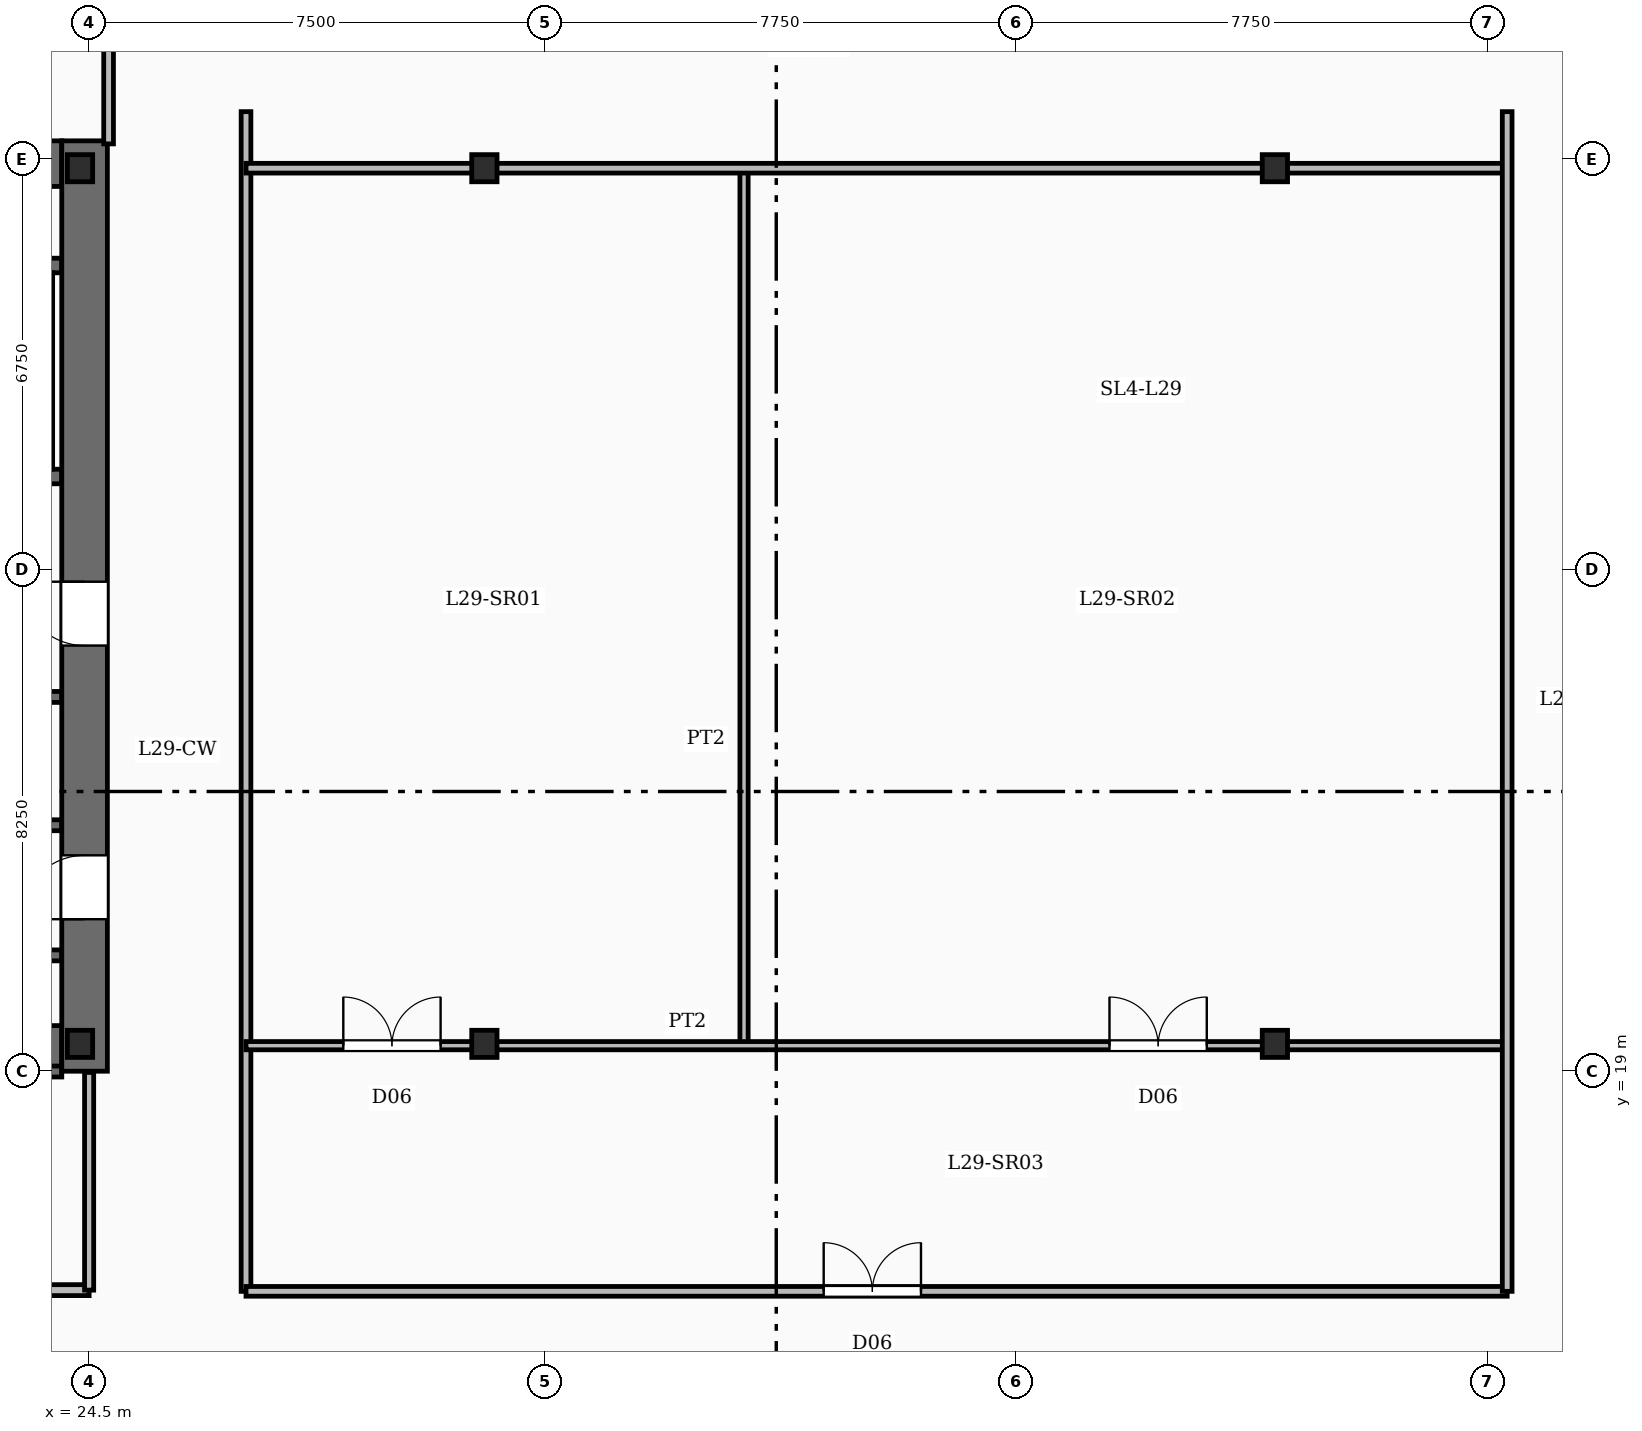
"""IFC4 building model, lengths in metres.
Left out: names, types, materials, properties, quantities, classifications, styles, units other than length and angle.
Written with IfcOpenShell. Run it as: python <this file> out.ifc"""

import sys

from ifc_helpers import new_model, si_unit, direction, frame, frame_2d, origin, origin_2d, place, context, subcontext, project, spatial, rectangle, i_section, extrude, element, fill, save


model = new_model("IFC4")
c1 = context("Model", 3, precision=1e-05, world=origin(), true_north=direction((0.0, 1.0)))
c2 = subcontext(c1, "Body", "Model", "MODEL_VIEW")
j1 = project(units=[si_unit("LENGTHUNIT", "METRE"), si_unit("PLANEANGLEUNIT", "RADIAN")], contexts=[c1])
p1 = place(None, origin())
s1 = spatial("IfcSite", under=j1, at=p1, CompositionType="ELEMENT")
p2 = place(p1, origin())
s2 = spatial("IfcBuilding", under=s1, at=p2, CompositionType="ELEMENT")
p3 = place(p2, frame((0.0, 0.0, 125.95)))
s3 = spatial("IfcBuildingStorey", under=s2, at=p3, CompositionType="ELEMENT", Elevation=125.95)
p4 = place(p3, frame((24.425, 19.0, -0.31), z_axis=(0.0, 0.0, 1.0), x_axis=(0.0, 1.0, 0.0)))
e1 = element("IfcWall", 1, at=p4, inside=s3, PredefinedType="SHEAR", context=c2, shape_type="SweptSolid", body=[
    extrude(rectangle(XDim=15.3, YDim=0.75, at=frame_2d((7.65, 0.0))), origin(), (0.0, 0.0, 1.0), 4.84),
])
p5 = place(p4, frame((2.5, 0.0, 0.31)))
e2 = element("IfcOpeningElement", 2, at=p5, cuts=e1, PredefinedType="OPENING", context=c2, shape_type="SweptSolid", body=[
    extrude(rectangle(XDim=1.05, YDim=2.15, at=frame_2d((0.525, 1.075))), frame((0.0, 0.385, 0.0), z_axis=(0.0, -1.0, 0.0), x_axis=(1.0, 0.0, 0.0)), (0.0, 0.0, 1.0), 0.77),
])
p6 = place(p4, frame((7.0, 0.0, 0.31)))
e3 = element("IfcOpeningElement", 3, at=p6, cuts=e1, PredefinedType="OPENING", context=c2, shape_type="SweptSolid", body=[
    extrude(rectangle(XDim=1.05, YDim=2.15, at=frame_2d((0.525, 1.075))), frame((0.0, 0.385, 0.0), z_axis=(0.0, -1.0, 0.0), x_axis=(1.0, 0.0, 0.0)), (0.0, 0.0, 1.0), 0.77),
])
for number, where, z_axis, x_axis in (
    (4, (14.85, 19.375, -0.31), (0.0, 0.0, 1.0), (1.0, 0.0, 0.0)),
    (5, (14.85, 33.925, -0.31), (0.0, 0.0, 1.0), (1.0, 0.0, 0.0)),
):
    element("IfcWall", number, at=place(p3, frame(where, z_axis=z_axis, x_axis=x_axis)), inside=s3, PredefinedType="SHEAR", context=c2, shape_type="SweptSolid", body=[
        extrude(rectangle(XDim=9.2, YDim=0.75, at=frame_2d((4.6, 0.0))), origin(), (0.0, 0.0, 1.0), 4.84),
    ])
for number, where, z_axis, x_axis in (
    (6, (24.35, 19.45, -0.31), (0.0, 0.0, 1.0), (1.0, 0.0, 0.0)),
    (7, (24.35, 33.85, -0.31), (0.0, 0.0, 1.0), (1.0, 0.0, 0.0)),
    (8, (31.0, 19.45, -0.31), (0.0, 0.0, 1.0), (1.0, 0.0, 0.0)),
    (9, (44.0, 19.45, -0.31), (0.0, 0.0, 1.0), (1.0, 0.0, 0.0)),
    (10, (31.0, 33.85, -0.31), (0.0, 0.0, 1.0), (1.0, 0.0, 0.0)),
    (11, (44.0, 33.85, -0.31), (0.0, 0.0, 1.0), (1.0, 0.0, 0.0)),
):
    element("IfcColumn", number, at=place(p3, frame(where, z_axis=z_axis, x_axis=x_axis)), inside=s3, PredefinedType="COLUMN", context=c2, shape_type="SweptSolid", body=[
        extrude(i_section(OverallWidth=0.416, OverallDepth=0.446, WebThickness=0.039, FlangeThickness=0.063, FilletRadius=0.02, at=origin_2d()), origin(), (0.0, 0.0, 1.0), 4.84),
    ])
p7 = place(p3, frame((24.05, 28.78, 0.0), z_axis=(0.0, 0.0, 1.0), x_axis=(-1.0, 0.0, 0.0)))
e12 = element("IfcWall", 12, at=p7, inside=s3, PredefinedType="SOLIDWALL", context=c2, shape_type="SweptSolid", body=[
    extrude(rectangle(XDim=9.2, YDim=0.24, at=frame_2d((4.6, 0.0))), origin(), (0.0, 0.0, 1.0), 4.53),
])
p8 = place(p7, frame((7.53, 0.0, 0.0)))
e13 = element("IfcOpeningElement", 13, at=p8, cuts=e12, PredefinedType="OPENING", context=c2, shape_type="SweptSolid", body=[
    extrude(rectangle(XDim=1.1, YDim=2.15, at=frame_2d((0.55, 1.075))), frame((0.0, 0.13, 0.0), z_axis=(0.0, -1.0, 0.0), x_axis=(1.0, 0.0, 0.0)), (0.0, 0.0, 1.0), 0.26),
])
p9 = place(p3, frame((14.85, 32.25, 0.0), z_axis=(0.0, 0.0, 1.0), x_axis=(1.0, 0.0, 0.0)))
e14 = element("IfcWall", 14, at=p9, inside=s3, PredefinedType="SOLIDWALL", context=c2, shape_type="SweptSolid", body=[
    extrude(rectangle(XDim=9.2, YDim=0.24, at=frame_2d((4.6, 0.0))), origin(), (0.0, 0.0, 1.0), 4.53),
])
p10 = place(p3, frame((23.78, 28.9, 0.0), z_axis=(0.0, 0.0, 1.0), x_axis=(0.0, 1.0, 0.0)))
e15 = element("IfcWall", 15, at=p10, inside=s3, PredefinedType="SOLIDWALL", context=c2, shape_type="SweptSolid", body=[
    extrude(rectangle(XDim=3.23, YDim=0.24, at=frame_2d((1.615, 0.0))), origin(), (0.0, 0.0, 1.0), 4.53),
])
p11 = place(p3, frame((20.9, 20.905, 0.0), z_axis=(0.0, 0.0, 1.0), x_axis=(1.0, 0.0, 0.0)))
e16 = element("IfcWall", 16, at=p11, inside=s3, PredefinedType="SOLIDWALL", context=c2, shape_type="SweptSolid", body=[
    extrude(rectangle(XDim=3.15, YDim=0.18, at=frame_2d((1.575, 0.0))), origin(), (0.0, 0.0, 1.0), 4.53),
])
p12 = place(p11, frame((0.7, 0.0, 0.0)))
e17 = element("IfcOpeningElement", 17, at=p12, cuts=e16, PredefinedType="OPENING", context=c2, shape_type="SweptSolid", body=[
    extrude(rectangle(XDim=1.2, YDim=2.2, at=frame_2d((0.6, 1.1))), frame((0.0, 0.1, 0.0), z_axis=(0.0, -1.0, 0.0), x_axis=(1.0, 0.0, 0.0)), (0.0, 0.0, 1.0), 0.2),
])
p13 = place(p3, frame((20.9, 18.995, 0.0), z_axis=(0.0, 0.0, 1.0), x_axis=(1.0, 0.0, 0.0)))
e18 = element("IfcWall", 18, at=p13, inside=s3, PredefinedType="SOLIDWALL", context=c2, shape_type="SweptSolid", body=[
    extrude(rectangle(XDim=3.15, YDim=0.18, at=frame_2d((1.575, 0.0))), origin(), (0.0, 0.0, 1.0), 4.53),
])
for number, where, z_axis, x_axis in (
    (19, (20.95, 25.155, 0.0), (0.0, 0.0, 1.0), (1.0, 0.0, 0.0)),
    (20, (20.95, 23.045, 0.0), (0.0, 0.0, 1.0), (1.0, 0.0, 0.0)),
):
    element("IfcWall", number, at=place(p3, frame(where, z_axis=z_axis, x_axis=x_axis)), inside=s3, PredefinedType="SOLIDWALL", context=c2, shape_type="SweptSolid", body=[
        extrude(rectangle(XDim=3.1, YDim=0.18, at=frame_2d((1.55, 0.0))), origin(), (0.0, 0.0, 1.0), 4.53),
    ])
p14 = place(p3, frame((14.6, 15.4, 0.0), z_axis=(0.0, 0.0, 1.0), x_axis=(1.0, 0.0, 0.0)))
e21 = element("IfcWall", 21, at=p14, inside=s3, PredefinedType="PARTITIONING", context=c2, shape_type="SweptSolid", body=[
    extrude(rectangle(XDim=9.9, YDim=0.18, at=frame_2d((4.95, 0.0))), origin(), (0.0, 0.0, 1.0), 3.59),
])
p15 = place(p14, frame((1.99, 0.0, 0.0)))
e22 = element("IfcOpeningElement", 22, at=p15, cuts=e21, PredefinedType="OPENING", context=c2, shape_type="SweptSolid", body=[
    extrude(rectangle(XDim=0.92, YDim=2.1, at=frame_2d((0.46, 1.05))), frame((0.0, 0.1, 0.0), z_axis=(0.0, -1.0, 0.0), x_axis=(1.0, 0.0, 0.0)), (0.0, 0.0, 1.0), 0.2),
])
p16 = place(p14, frame((6.94, 0.0, 0.0)))
e23 = element("IfcOpeningElement", 23, at=p16, cuts=e21, PredefinedType="OPENING", context=c2, shape_type="SweptSolid", body=[
    extrude(rectangle(XDim=0.92, YDim=2.1, at=frame_2d((0.46, 1.05))), frame((0.0, 0.1, 0.0), z_axis=(0.0, -1.0, 0.0), x_axis=(1.0, 0.0, 0.0)), (0.0, 0.0, 1.0), 0.2),
])
p17 = place(p3, frame((24.5, 15.4, 0.0), z_axis=(0.0, 0.0, 1.0), x_axis=(0.0, 1.0, 0.0)))
e24 = element("IfcWall", 24, at=p17, inside=s3, PredefinedType="PARTITIONING", context=c2, shape_type="SweptSolid", body=[
    extrude(rectangle(XDim=3.58, YDim=0.15, at=frame_2d((1.79, 0.0))), origin(), (0.0, 0.0, 1.0), 3.59),
])
p18 = place(p3, frame((27.08, 19.42, 0.0), z_axis=(0.0, 0.0, 1.0), x_axis=(1.0, 0.0, 0.0)))
e25 = element("IfcWall", 25, at=p18, inside=s3, PredefinedType="PARTITIONING", context=c2, shape_type="SweptSolid", body=[
    extrude(rectangle(XDim=20.74, YDim=0.135, at=frame_2d((10.37, 0.0))), origin(), (0.0, 0.0, 1.0), 3.59),
])
p19 = place(p18, frame((1.6, 0.0, 0.0)))
e26 = element("IfcOpeningElement", 26, at=p19, cuts=e25, PredefinedType="OPENING", context=c2, shape_type="SweptSolid", body=[
    extrude(rectangle(XDim=1.6, YDim=2.15, at=frame_2d((0.8, 1.075))), frame((0.0, 0.077, 0.0), z_axis=(0.0, -1.0, 0.0), x_axis=(1.0, 0.0, 0.0)), (0.0, 0.0, 1.0), 0.155),
])
p20 = place(p18, frame((14.2, 0.0, 0.0)))
e27 = element("IfcOpeningElement", 27, at=p20, cuts=e25, PredefinedType="OPENING", context=c2, shape_type="SweptSolid", body=[
    extrude(rectangle(XDim=1.6, YDim=2.15, at=frame_2d((0.8, 1.075))), frame((0.0, 0.077, 0.0), z_axis=(0.0, -1.0, 0.0), x_axis=(1.0, 0.0, 0.0)), (0.0, 0.0, 1.0), 0.155),
])
p21 = place(p3, frame((27.08, 33.85, 0.0), z_axis=(0.0, 0.0, 1.0), x_axis=(1.0, 0.0, 0.0)))
e28 = element("IfcWall", 28, at=p21, inside=s3, PredefinedType="PARTITIONING", context=c2, shape_type="SweptSolid", body=[
    extrude(rectangle(XDim=20.74, YDim=0.16, at=frame_2d((10.37, 0.0))), origin(), (0.0, 0.0, 1.0), 3.59),
])
p22 = place(p3, frame((35.27, 19.42, 0.0), z_axis=(0.0, 0.0, 1.0), x_axis=(0.0, 1.0, 0.0)))
e29 = element("IfcWall", 29, at=p22, inside=s3, PredefinedType="PARTITIONING", context=c2, shape_type="SweptSolid", body=[
    extrude(rectangle(XDim=14.43, YDim=0.135, at=frame_2d((7.215, 0.0))), origin(), (0.0, 0.0, 1.0), 3.59),
])
p23 = place(p3, frame((27.08, 15.38, 0.0), z_axis=(0.0, 0.0, 1.0), x_axis=(1.0, 0.0, 0.0)))
e30 = element("IfcWall", 30, at=p23, inside=s3, PredefinedType="PARTITIONING", context=c2, shape_type="SweptSolid", body=[
    extrude(rectangle(XDim=20.74, YDim=0.16, at=frame_2d((10.37, 0.0))), origin(), (0.0, 0.0, 1.0), 3.59),
])
p24 = place(p23, frame((9.5, 0.0, 0.0)))
e31 = element("IfcOpeningElement", 31, at=p24, cuts=e30, PredefinedType="OPENING", context=c2, shape_type="SweptSolid", body=[
    extrude(rectangle(XDim=1.6, YDim=2.15, at=frame_2d((0.8, 1.075))), frame((0.0, 0.09, 0.0), z_axis=(0.0, -1.0, 0.0), x_axis=(1.0, 0.0, 0.0)), (0.0, 0.0, 1.0), 0.18),
])
for number, where, z_axis, x_axis in (
    (32, (27.08, 15.38, 0.0), (0.0, 0.0, 1.0), (0.0, 1.0, 0.0)),
    (33, (47.82, 15.38, 0.0), (0.0, 0.0, 1.0), (0.0, 1.0, 0.0)),
):
    element("IfcWall", number, at=place(p3, frame(where, z_axis=z_axis, x_axis=x_axis)), inside=s3, PredefinedType="PARTITIONING", context=c2, shape_type="SweptSolid", body=[
        extrude(rectangle(XDim=19.4, YDim=0.16, at=frame_2d((9.7, 0.0))), origin(), (0.0, 0.0, 1.0), 3.59),
    ])
p25 = place(p3, frame((24.82, 34.25, 0.0), z_axis=(0.0, 0.0, 1.0), x_axis=(0.0, 1.0, 0.0)))
e34 = element("IfcWall", 34, at=p25, inside=s3, PredefinedType="PARTITIONING", context=c2, shape_type="SweptSolid", body=[
    extrude(rectangle(XDim=2.77, YDim=0.16, at=frame_2d((1.385, 0.0))), origin(), (0.0, 0.0, 1.0), 3.59),
])
p26 = place(p5, origin())
e35 = element("IfcDoor", 35, at=p26, inside=s3, OperationType="SINGLE_SWING_LEFT", PredefinedType="DOOR", context=c2, shape_type="SweptSolid", body=[
    extrude(rectangle(XDim=1.05, YDim=2.15, at=frame_2d((0.525, 1.075))), frame((0.0, 0.025, 0.0), z_axis=(0.0, -1.0, 0.0), x_axis=(1.0, 0.0, 0.0)), (0.0, 0.0, 1.0), 0.05),
])
fill(e2, e35)
p27 = place(p6, origin())
e36 = element("IfcDoor", 36, at=p27, inside=s3, OperationType="SINGLE_SWING_RIGHT", PredefinedType="DOOR", context=c2, shape_type="SweptSolid", body=[
    extrude(rectangle(XDim=1.05, YDim=2.15, at=frame_2d((0.525, 1.075))), frame((0.0, 0.025, 0.0), z_axis=(0.0, -1.0, 0.0), x_axis=(1.0, 0.0, 0.0)), (0.0, 0.0, 1.0), 0.05),
])
fill(e3, e36)
p28 = place(p19, origin())
e37 = element("IfcDoor", 37, at=p28, inside=s3, OperationType="DOUBLE_DOOR_SINGLE_SWING", PredefinedType="DOOR", context=c2, shape_type="SweptSolid", body=[
    extrude(rectangle(XDim=1.6, YDim=2.15, at=frame_2d((0.8, 1.075))), frame((0.0, 0.025, 0.0), z_axis=(0.0, -1.0, 0.0), x_axis=(1.0, 0.0, 0.0)), (0.0, 0.0, 1.0), 0.05),
])
fill(e26, e37)
p29 = place(p20, origin())
e38 = element("IfcDoor", 38, at=p29, inside=s3, OperationType="DOUBLE_DOOR_SINGLE_SWING", PredefinedType="DOOR", context=c2, shape_type="SweptSolid", body=[
    extrude(rectangle(XDim=1.6, YDim=2.15, at=frame_2d((0.8, 1.075))), frame((0.0, 0.025, 0.0), z_axis=(0.0, -1.0, 0.0), x_axis=(1.0, 0.0, 0.0)), (0.0, 0.0, 1.0), 0.05),
])
fill(e27, e38)
p30 = place(p24, origin())
e39 = element("IfcDoor", 39, at=p30, inside=s3, OperationType="DOUBLE_DOOR_SINGLE_SWING", PredefinedType="DOOR", context=c2, shape_type="SweptSolid", body=[
    extrude(rectangle(XDim=1.6, YDim=2.15, at=frame_2d((0.8, 1.075))), frame((0.0, 0.025, 0.0), z_axis=(0.0, -1.0, 0.0), x_axis=(1.0, 0.0, 0.0)), (0.0, 0.0, 1.0), 0.05),
])
fill(e31, e39)
save(model, sys.argv[1])
